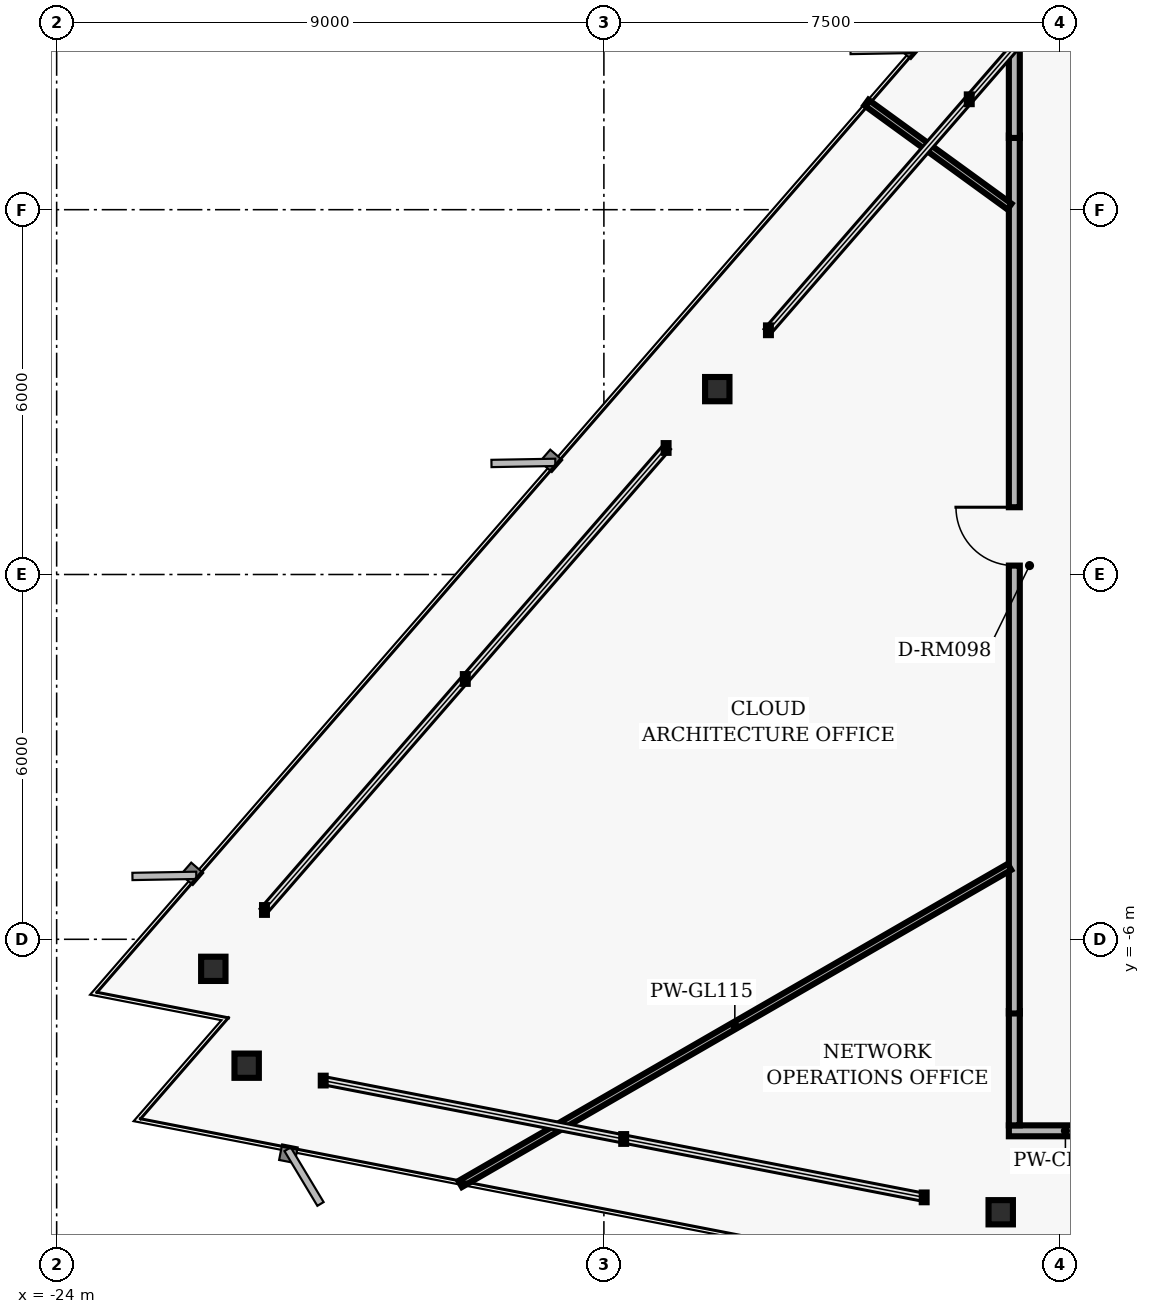
"""IFC4 building model, lengths in metres.
Left out: names, types, materials, properties, quantities, classifications, styles, units other than length and angle.
Written with IfcOpenShell. Run it as: python <this file> out.ifc"""

import sys

from ifc_helpers import new_model, si_unit, direction, frame, frame_2d, origin, origin_2d, place, context, subcontext, project, spatial, rectangle, i_section, extrude, element, fill, save


model = new_model("IFC4")
c1 = context("Model", 3, precision=1e-05, world=origin(), true_north=direction((0.0, 1.0)))
c2 = subcontext(c1, "Body", "Model", "MODEL_VIEW")
j1 = project(units=[si_unit("LENGTHUNIT", "METRE"), si_unit("PLANEANGLEUNIT", "RADIAN")], contexts=[c1])
p1 = place(None, origin())
s1 = spatial("IfcSite", under=j1, at=p1, CompositionType="ELEMENT")
p2 = place(p1, origin())
s2 = spatial("IfcBuilding", under=s1, at=p2, CompositionType="ELEMENT")
p3 = place(p2, frame((0.0, 0.0, 153.28)))
s3 = spatial("IfcBuildingStorey", under=s2, at=p3, CompositionType="ELEMENT", Elevation=153.28)
for number, where, z_axis, x_axis in (
    (1, (-13.135, 3.049, 0.0), (0.0, 0.0, 1.0), (1.0, 0.0, 0.0)),
    (2, (-21.424, -6.486, 0.0), (0.0, 0.0, 1.0), (1.0, 0.0, 0.0)),
    (3, (-20.875, -8.079, 0.0), (0.0, 0.0, 1.0), (1.0, 0.0, 0.0)),
    (4, (-8.474, -10.49, 0.0), (0.0, 0.0, 1.0), (1.0, 0.0, 0.0)),
):
    element("IfcColumn", number, at=place(p3, frame(where, z_axis=z_axis, x_axis=x_axis)), inside=s3, PredefinedType="COLUMN", context=c2, shape_type="SweptSolid", body=[
        extrude(i_section(OverallWidth=0.401, OverallDepth=0.399, WebThickness=0.025, FlangeThickness=0.04, FilletRadius=0.018, at=origin_2d()), origin(), (0.0, 0.0, 1.0), 3.04),
    ])
p4 = place(p3, frame((-6.48, -9.15, 0.0), z_axis=(0.0, 0.0, 1.0), x_axis=(-1.0, 0.0, 0.0)))
e5 = element("IfcWall", 5, at=p4, inside=s3, PredefinedType="PARTITIONING", context=c2, shape_type="SweptSolid", body=[
    extrude(rectangle(XDim=1.86, YDim=0.18, at=frame_2d((0.93, 0.0))), origin(), (0.0, 0.0, 1.0), 2.33),
])
p5 = place(p3, frame((-8.25, -9.06, 0.0), z_axis=(0.0, 0.0, 1.0), x_axis=(0.0, 1.0, 0.0)))
e6 = element("IfcWall", 6, at=p5, inside=s3, PredefinedType="PARTITIONING", context=c2, shape_type="SweptSolid", body=[
    extrude(rectangle(XDim=1.88, YDim=0.18, at=frame_2d((0.94, 0.0))), origin(), (0.0, 0.0, 1.0), 2.763),
])
p6 = place(p3, frame((-8.25, -7.22, 0.0), z_axis=(0.0, 0.0, 1.0), x_axis=(0.0, 1.0, 0.0)))
e7 = element("IfcWall", 7, at=p6, inside=s3, PredefinedType="PARTITIONING", context=c2, shape_type="SweptSolid", body=[
    extrude(rectangle(XDim=14.44, YDim=0.18, at=frame_2d((7.22, 0.0))), origin(), (0.0, 0.0, 1.0), 2.763),
])
p7 = place(p6, frame((7.366, 0.0, 0.0)))
e8 = element("IfcOpeningElement", 8, at=p7, cuts=e7, PredefinedType="OPENING", context=c2, shape_type="SweptSolid", body=[
    extrude(rectangle(XDim=0.96, YDim=2.02, at=frame_2d((0.48, 1.01))), frame((0.0, 0.1, 0.0), z_axis=(0.0, -1.0, 0.0), x_axis=(1.0, 0.0, 0.0)), (0.0, 0.0, 1.0), 0.2),
])
p8 = place(p3, frame((-8.25, 7.18, 0.0), z_axis=(0.0, 0.0, 1.0), x_axis=(0.0, 1.0, 0.0)))
e9 = element("IfcWall", 9, at=p8, inside=s3, PredefinedType="PARTITIONING", context=c2, shape_type="SweptSolid", body=[
    extrude(rectangle(XDim=1.88, YDim=0.18, at=frame_2d((0.94, 0.0))), origin(), (0.0, 0.0, 1.0), 2.763),
])
p9 = place(p3, frame((-8.33, -4.809, 0.0), z_axis=(0.0, 0.0, 1.0), x_axis=(-0.866024997974, -0.500000702884, 0.0)))
e10 = element("IfcWall", 10, at=p9, inside=s3, PredefinedType="MOVABLE", context=c2, shape_type="SweptSolid", body=[
    extrude(rectangle(XDim=10.431, YDim=0.115, at=frame_2d((5.215, 0.0))), origin(), (0.0, 0.0, 1.0), 2.132),
])
p10 = place(p3, frame((-8.33, 6.052, 0.0), z_axis=(0.0, 0.0, 1.0), x_axis=(-0.808997455981, 0.587812143644, 0.0)))
e11 = element("IfcWall", 11, at=p10, inside=s3, PredefinedType="MOVABLE", context=c2, shape_type="SweptSolid", body=[
    extrude(rectangle(XDim=2.907, YDim=0.115, at=frame_2d((1.454, 0.0))), origin(), (0.0, 0.0, 1.0), 2.763),
])
p11 = place(p7, origin())
e12 = element("IfcDoor", 12, at=p11, inside=s3, OperationType="SINGLE_SWING_RIGHT", PredefinedType="DOOR", context=c2, shape_type="SweptSolid", body=[
    extrude(rectangle(XDim=0.96, YDim=2.02, at=frame_2d((0.48, 1.01))), frame((0.0, 0.025, 0.0), z_axis=(0.0, -1.0, 0.0), x_axis=(1.0, 0.0, 0.0)), (0.0, 0.0, 1.0), 0.05),
])
fill(e8, e12)
save(model, sys.argv[1])
